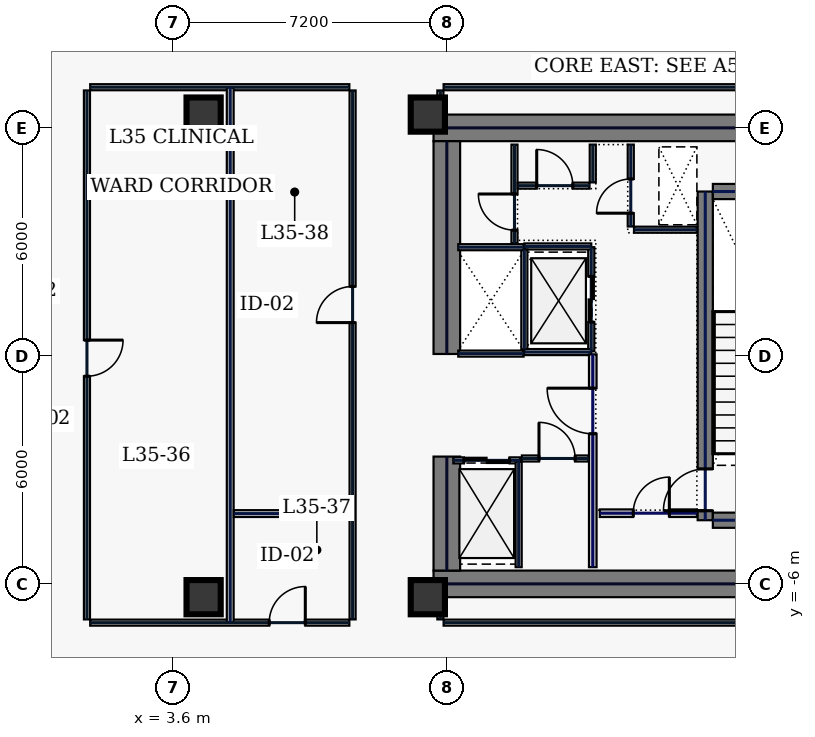
"""IFC4 building model, lengths in metres.
Left out: names, types, materials, properties, quantities, classifications, styles, units other than length and angle.
Written with IfcOpenShell. Run it as: python <this file> out.ifc"""

import sys

from ifc_helpers import new_model, si_unit, direction, frame, frame_2d, origin, origin_2d, place, context, subcontext, project, spatial, rectangle, hollow_rectangle, extrude, element, fill, save


model = new_model("IFC4")
c1 = context("Model", 3, precision=1e-05, world=origin(), true_north=direction((0.0, 1.0)))
c2 = subcontext(c1, "Body", "Model", "MODEL_VIEW")
j1 = project(units=[si_unit("LENGTHUNIT", "METRE"), si_unit("PLANEANGLEUNIT", "RADIAN")], contexts=[c1])
p1 = place(None, origin())
s1 = spatial("IfcSite", under=j1, at=p1, CompositionType="ELEMENT")
p2 = place(p1, origin())
s2 = spatial("IfcBuilding", under=s1, at=p2, CompositionType="ELEMENT")
p3 = place(p2, frame((0.0, 0.0, 156.2)))
s3 = spatial("IfcBuildingStorey", under=s2, at=p3, CompositionType="ELEMENT", Elevation=156.2)
for number, where, z_axis, x_axis in (
    (1, (10.45, 6.0, 0.0), (0.0, 0.0, 1.0), (1.0, 0.0, 0.0)),
    (2, (10.45, -6.0, 0.0), (0.0, 0.0, 1.0), (1.0, 0.0, 0.0)),
):
    element("IfcWall", number, at=place(p3, frame(where, z_axis=z_axis, x_axis=x_axis)), inside=s3, PredefinedType="SHEAR", context=c2, shape_type="SweptSolid", body=[
        extrude(rectangle(XDim=11.55, YDim=0.7, at=frame_2d((5.775, 0.0))), origin(), (0.0, 0.0, 1.0), 3.74),
    ])
p4 = place(p3, frame((10.8, -5.65, 0.0), z_axis=(0.0, 0.0, 1.0), x_axis=(0.0, 1.0, 0.0)))
e3 = element("IfcWall", 3, at=p4, inside=s3, PredefinedType="SHEAR", context=c2, shape_type="SweptSolid", body=[
    extrude(rectangle(XDim=3.0, YDim=0.7, at=frame_2d((1.5, 0.0))), origin(), (0.0, 0.0, 1.0), 3.74),
])
p5 = place(p3, frame((10.8, 0.05, 0.0), z_axis=(0.0, 0.0, 1.0), x_axis=(0.0, 1.0, 0.0)))
e4 = element("IfcWall", 4, at=p5, inside=s3, PredefinedType="SHEAR", context=c2, shape_type="SweptSolid", body=[
    extrude(rectangle(XDim=5.6, YDim=0.7, at=frame_2d((2.8, 0.0))), origin(), (0.0, 0.0, 1.0), 3.74),
])
p6 = place(p3, frame((17.6, -4.325, 0.0), z_axis=(0.0, 0.0, 1.0), x_axis=(0.0, 1.0, 0.0)))
e5 = element("IfcWall", 5, at=p6, inside=s3, PredefinedType="SHEAR", context=c2, shape_type="SweptSolid", body=[
    extrude(rectangle(XDim=8.65, YDim=0.4, at=frame_2d((4.325, 0.0))), origin(), (0.0, 0.0, 1.0), 3.74),
])
p7 = place(p6, frame((0.25, 0.0, 0.0)))
e6 = element("IfcOpeningElement", 6, at=p7, cuts=e5, PredefinedType="OPENING", context=c2, shape_type="SweptSolid", body=[
    extrude(rectangle(XDim=1.1, YDim=2.2, at=frame_2d((0.55, 1.1))), frame((0.0, 0.21, 0.0), z_axis=(0.0, -1.0, 0.0), x_axis=(1.0, 0.0, 0.0)), (0.0, 0.0, 1.0), 0.42),
])
for number, where, z_axis, x_axis in (
    (7, (17.8, -4.325, 0.0), (0.0, 0.0, 1.0), (1.0, 0.0, 0.0)),
    (8, (17.8, 4.325, 0.0), (0.0, 0.0, 1.0), (1.0, 0.0, 0.0)),
):
    element("IfcWall", number, at=place(p3, frame(where, z_axis=z_axis, x_axis=x_axis)), inside=s3, PredefinedType="SHEAR", context=c2, shape_type="SweptSolid", body=[
        extrude(rectangle(XDim=3.4, YDim=0.4, at=frame_2d((1.7, 0.0))), origin(), (0.0, 0.0, 1.0), 3.74),
    ])
for number, where, z_axis, x_axis in (
    (9, (10.3, -6.35, 0.0), (0.0, 0.0, 1.0), (1.0, 0.0, 0.0)),
    (10, (10.3, 6.35, 0.0), (0.0, 0.0, 1.0), (1.0, 0.0, 0.0)),
    (11, (4.4, -6.35, 0.0), (0.0, 0.0, 1.0), (1.0, 0.0, 0.0)),
    (12, (4.4, 6.35, 0.0), (0.0, 0.0, 1.0), (1.0, 0.0, 0.0)),
):
    element("IfcColumn", number, at=place(p3, frame(where, z_axis=z_axis, x_axis=x_axis)), inside=s3, PredefinedType="COLUMN", context=c2, shape_type="SweptSolid", body=[
        extrude(hollow_rectangle(XDim=0.9, YDim=0.9, WallThickness=0.04, at=origin_2d()), origin(), (0.0, 0.0, 1.0), 3.74),
    ])
p8 = place(p3, frame((14.6, 0.12, 0.0), z_axis=(0.0, 0.0, 1.0), x_axis=(0.0, 1.0, 0.0)))
e13 = element("IfcWall", 13, at=p8, inside=s3, PredefinedType="PARTITIONING", context=c2, shape_type="SweptSolid", body=[
    extrude(rectangle(XDim=2.74, YDim=0.16, at=frame_2d((1.37, 0.0))), origin(), (0.0, 0.0, 1.0), 3.74),
])
p9 = place(p8, frame((0.77, 0.0, 0.0)))
e14 = element("IfcOpeningElement", 14, at=p9, cuts=e13, PredefinedType="OPENING", context=c2, shape_type="SweptSolid", body=[
    extrude(rectangle(XDim=1.2, YDim=2.2, at=frame_2d((0.6, 1.1))), frame((0.0, 0.09, 0.0), z_axis=(0.0, -1.0, 0.0), x_axis=(1.0, 0.0, 0.0)), (0.0, 0.0, 1.0), 0.18),
])
for number, where, z_axis, x_axis in (
    (15, (12.84, 0.1, 0.0), (0.0, 0.0, 1.0), (1.0, 0.0, 0.0)),
    (16, (12.84, 2.88, 0.0), (0.0, 0.0, 1.0), (1.0, 0.0, 0.0)),
):
    element("IfcWall", number, at=place(p3, frame(where, z_axis=z_axis, x_axis=x_axis)), inside=s3, PredefinedType="PARTITIONING", context=c2, shape_type="SweptSolid", body=[
        extrude(rectangle(XDim=1.76, YDim=0.16, at=frame_2d((0.88, 0.0))), origin(), (0.0, 0.0, 1.0), 3.74),
    ])
p10 = place(p3, frame((12.84, 0.18, 0.0), z_axis=(0.0, 0.0, 1.0), x_axis=(0.0, 1.0, 0.0)))
e17 = element("IfcWall", 17, at=p10, inside=s3, PredefinedType="PARTITIONING", context=c2, shape_type="SweptSolid", body=[
    extrude(rectangle(XDim=2.62, YDim=0.16, at=frame_2d((1.31, 0.0))), origin(), (0.0, 0.0, 1.0), 3.74),
])
p11 = place(p3, frame((10.97, -2.75, 0.0), z_axis=(0.0, 0.0, 1.0), x_axis=(1.0, 0.0, 0.0)))
e18 = element("IfcWall", 18, at=p11, inside=s3, PredefinedType="PARTITIONING", context=c2, shape_type="SweptSolid", body=[
    extrude(rectangle(XDim=1.76, YDim=0.16, at=frame_2d((0.88, 0.0))), origin(), (0.0, 0.0, 1.0), 3.74),
])
p12 = place(p11, frame((0.28, 0.0, 0.0)))
e19 = element("IfcOpeningElement", 19, at=p12, cuts=e18, PredefinedType="OPENING", context=c2, shape_type="SweptSolid", body=[
    extrude(rectangle(XDim=1.2, YDim=2.2, at=frame_2d((0.6, 1.1))), frame((0.0, 0.09, 0.0), z_axis=(0.0, -1.0, 0.0), x_axis=(1.0, 0.0, 0.0)), (0.0, 0.0, 1.0), 0.18),
])
for number, where, z_axis, x_axis in (
    (20, (11.1, 0.06, 0.0), (0.0, 0.0, 1.0), (1.0, 0.0, 0.0)),
    (21, (11.1, 2.86, 0.0), (0.0, 0.0, 1.0), (1.0, 0.0, 0.0)),
):
    element("IfcWall", number, at=place(p3, frame(where, z_axis=z_axis, x_axis=x_axis)), inside=s3, PredefinedType="PARTITIONING", context=c2, shape_type="SweptSolid", body=[
        extrude(rectangle(XDim=1.72, YDim=0.16, at=frame_2d((0.86, 0.0))), origin(), (0.0, 0.0, 1.0), 3.74),
    ])
p13 = place(p3, frame((15.64, 3.405, 0.0), z_axis=(0.0, 0.0, 1.0), x_axis=(0.0, 1.0, 0.0)))
e22 = element("IfcWall", 22, at=p13, inside=s3, PredefinedType="PARTITIONING", context=c2, shape_type="SweptSolid", body=[
    extrude(rectangle(XDim=2.155, YDim=0.16, at=frame_2d((1.078, 0.0))), origin(), (0.0, 0.0, 1.0), 3.74),
])
p14 = place(p13, frame((0.35, 0.0, 0.0)))
e23 = element("IfcOpeningElement", 23, at=p14, cuts=e22, PredefinedType="OPENING", context=c2, shape_type="SweptSolid", body=[
    extrude(rectangle(XDim=0.9, YDim=2.2, at=frame_2d((0.45, 1.1))), frame((0.0, 0.09, 0.0), z_axis=(0.0, -1.0, 0.0), x_axis=(1.0, 0.0, 0.0)), (0.0, 0.0, 1.0), 0.18),
])
p15 = place(p3, frame((15.725, 3.32, 0.0), z_axis=(0.0, 0.0, 1.0), x_axis=(1.0, 0.0, 0.0)))
e24 = element("IfcWall", 24, at=p15, inside=s3, PredefinedType="PARTITIONING", context=c2, shape_type="SweptSolid", body=[
    extrude(rectangle(XDim=1.655, YDim=0.16, at=frame_2d((0.827, 0.0))), origin(), (0.0, 0.0, 1.0), 3.74),
])
p16 = place(p3, frame((14.825, -4.14, 0.0), z_axis=(0.0, 0.0, 1.0), x_axis=(1.0, 0.0, 0.0)))
e25 = element("IfcWall", 25, at=p16, inside=s3, PredefinedType="SOLIDWALL", context=c2, shape_type="SweptSolid", body=[
    extrude(rectangle(XDim=2.555, YDim=0.2, at=frame_2d((1.277, 0.0))), origin(), (0.0, 0.0, 1.0), 3.74),
])
p17 = place(p16, frame((0.88, 0.0, 0.0)))
e26 = element("IfcOpeningElement", 26, at=p17, cuts=e25, PredefinedType="OPENING", context=c2, shape_type="SweptSolid", body=[
    extrude(rectangle(XDim=0.95, YDim=2.2, at=frame_2d((0.475, 1.1))), frame((0.0, 0.11, 0.0), z_axis=(0.0, -1.0, 0.0), x_axis=(1.0, 0.0, 0.0)), (0.0, 0.0, 1.0), 0.22),
])
p18 = place(p3, frame((12.775, -2.7, 0.0), z_axis=(0.0, 0.0, 1.0), x_axis=(1.0, 0.0, 0.0)))
e27 = element("IfcWall", 27, at=p18, inside=s3, PredefinedType="PARTITIONING", context=c2, shape_type="SweptSolid", body=[
    extrude(rectangle(XDim=1.76, YDim=0.16, at=frame_2d((0.88, 0.0))), origin(), (0.0, 0.0, 1.0), 3.74),
])
p19 = place(p18, frame((0.45, 0.0, 0.0)))
e28 = element("IfcOpeningElement", 28, at=p19, cuts=e27, PredefinedType="OPENING", context=c2, shape_type="SweptSolid", body=[
    extrude(rectangle(XDim=0.95, YDim=2.2, at=frame_2d((0.475, 1.1))), frame((0.0, 0.09, 0.0), z_axis=(0.0, -1.0, 0.0), x_axis=(1.0, 0.0, 0.0)), (0.0, 0.0, 1.0), 0.18),
])
p20 = place(p3, frame((12.69, -5.56, 0.0), z_axis=(0.0, 0.0, 1.0), x_axis=(0.0, 1.0, 0.0)))
e29 = element("IfcWall", 29, at=p20, inside=s3, PredefinedType="PARTITIONING", context=c2, shape_type="SweptSolid", body=[
    extrude(rectangle(XDim=2.775, YDim=0.16, at=frame_2d((1.388, 0.0))), origin(), (0.0, 0.0, 1.0), 3.74),
])
p21 = place(p3, frame((12.58, 2.96, 0.0), z_axis=(0.0, 0.0, 1.0), x_axis=(0.0, 1.0, 0.0)))
e30 = element("IfcWall", 30, at=p21, inside=s3, PredefinedType="PARTITIONING", context=c2, shape_type="SweptSolid", body=[
    extrude(rectangle(XDim=2.6, YDim=0.16, at=frame_2d((1.3, 0.0))), origin(), (0.0, 0.0, 1.0), 3.74),
])
p22 = place(p21, frame((0.35, 0.0, 0.0)))
e31 = element("IfcOpeningElement", 31, at=p22, cuts=e30, PredefinedType="OPENING", context=c2, shape_type="SweptSolid", body=[
    extrude(rectangle(XDim=0.95, YDim=2.2, at=frame_2d((0.475, 1.1))), frame((0.0, 0.09, 0.0), z_axis=(0.0, -1.0, 0.0), x_axis=(1.0, 0.0, 0.0)), (0.0, 0.0, 1.0), 0.18),
])
p23 = place(p3, frame((12.665, 4.48, 0.0), z_axis=(0.0, 0.0, 1.0), x_axis=(1.0, 0.0, 0.0)))
e32 = element("IfcWall", 32, at=p23, inside=s3, PredefinedType="PARTITIONING", context=c2, shape_type="SweptSolid", body=[
    extrude(rectangle(XDim=1.89, YDim=0.16, at=frame_2d((0.945, 0.0))), origin(), (0.0, 0.0, 1.0), 3.74),
])
p24 = place(p23, frame((0.5, 0.0, 0.0)))
e33 = element("IfcOpeningElement", 33, at=p24, cuts=e32, PredefinedType="OPENING", context=c2, shape_type="SweptSolid", body=[
    extrude(rectangle(XDim=0.95, YDim=2.2, at=frame_2d((0.475, 1.1))), frame((0.0, 0.09, 0.0), z_axis=(0.0, -1.0, 0.0), x_axis=(1.0, 0.0, 0.0)), (0.0, 0.0, 1.0), 0.18),
])
p25 = place(p3, frame((14.64, 4.565, 0.0), z_axis=(0.0, 0.0, 1.0), x_axis=(0.0, 1.0, 0.0)))
e34 = element("IfcWall", 34, at=p25, inside=s3, PredefinedType="PARTITIONING", context=c2, shape_type="SweptSolid", body=[
    extrude(rectangle(XDim=0.995, YDim=0.16, at=frame_2d((0.498, 0.0))), origin(), (0.0, 0.0, 1.0), 3.74),
])
p26 = place(p3, frame((14.64, -5.56, 0.0), z_axis=(0.0, 0.0, 1.0), x_axis=(0.0, 1.0, 0.0)))
e35 = element("IfcWall", 35, at=p26, inside=s3, PredefinedType="SOLIDWALL", context=c2, shape_type="SweptSolid", body=[
    extrude(rectangle(XDim=5.6, YDim=0.2, at=frame_2d((2.8, 0.0))), origin(), (0.0, 0.0, 1.0), 3.74),
])
p27 = place(p26, frame((3.51, 0.0, 0.0)))
e36 = element("IfcOpeningElement", 36, at=p27, cuts=e35, PredefinedType="OPENING", context=c2, shape_type="SweptSolid", body=[
    extrude(rectangle(XDim=1.2, YDim=2.2, at=frame_2d((0.6, 1.1))), frame((0.0, 0.11, 0.0), z_axis=(0.0, -1.0, 0.0), x_axis=(1.0, 0.0, 0.0)), (0.0, 0.0, 1.0), 0.22),
])
p28 = place(p3, frame((24.965, 7.07, 0.0), z_axis=(0.0, 0.0, 1.0), x_axis=(-1.0, 0.0, 0.0)))
e37 = element("IfcWall", 37, at=p28, inside=s3, PredefinedType="PARTITIONING", context=c2, shape_type="SweptSolid", body=[
    extrude(rectangle(XDim=14.25, YDim=0.16, at=frame_2d((7.125, 0.0))), origin(), (0.0, 0.0, 1.0), 3.74),
])
p29 = place(p3, frame((10.63, 6.985, 0.0), z_axis=(0.0, 0.0, 1.0), x_axis=(0.0, -1.0, 0.0)))
e38 = element("IfcWall", 38, at=p29, inside=s3, PredefinedType="PARTITIONING", context=c2, shape_type="SweptSolid", body=[
    extrude(rectangle(XDim=0.565, YDim=0.16, at=frame_2d((0.283, 0.0))), origin(), (0.0, 0.0, 1.0), 3.74),
])
p30 = place(p3, frame((10.63, -6.42, 0.0), z_axis=(0.0, 0.0, 1.0), x_axis=(0.0, -1.0, 0.0)))
e39 = element("IfcWall", 39, at=p30, inside=s3, PredefinedType="PARTITIONING", context=c2, shape_type="SweptSolid", body=[
    extrude(rectangle(XDim=0.515, YDim=0.16, at=frame_2d((0.258, 0.0))), origin(), (0.0, 0.0, 1.0), 3.74),
])
p31 = place(p3, frame((10.715, -7.02, 0.0), z_axis=(0.0, 0.0, 1.0), x_axis=(1.0, 0.0, 0.0)))
e40 = element("IfcWall", 40, at=p31, inside=s3, PredefinedType="PARTITIONING", context=c2, shape_type="SweptSolid", body=[
    extrude(rectangle(XDim=14.25, YDim=0.16, at=frame_2d((7.125, 0.0))), origin(), (0.0, 0.0, 1.0), 3.74),
])
p32 = place(p3, frame((8.235, 7.07, 0.0), z_axis=(0.0, 0.0, 1.0), x_axis=(-1.0, 0.0, 0.0)))
e41 = element("IfcWall", 41, at=p32, inside=s3, PredefinedType="PARTITIONING", context=c2, shape_type="SweptSolid", body=[
    extrude(rectangle(XDim=6.82, YDim=0.16, at=frame_2d((3.41, 0.0))), origin(), (0.0, 0.0, 1.0), 3.74),
])
p33 = place(p3, frame((1.33, 6.985, 0.0), z_axis=(0.0, 0.0, 1.0), x_axis=(0.0, -1.0, 0.0)))
e42 = element("IfcWall", 42, at=p33, inside=s3, PredefinedType="PARTITIONING", context=c2, shape_type="SweptSolid", body=[
    extrude(rectangle(XDim=13.92, YDim=0.16, at=frame_2d((6.96, 0.0))), origin(), (0.0, 0.0, 1.0), 3.74),
])
p34 = place(p33, frame((6.57, 0.0, 0.0)))
e43 = element("IfcOpeningElement", 43, at=p34, cuts=e42, PredefinedType="OPENING", context=c2, shape_type="SweptSolid", body=[
    extrude(rectangle(XDim=0.95, YDim=2.2, at=frame_2d((0.475, 1.1))), frame((0.0, 0.09, 0.0), z_axis=(0.0, -1.0, 0.0), x_axis=(1.0, 0.0, 0.0)), (0.0, 0.0, 1.0), 0.18),
])
p35 = place(p3, frame((1.415, -7.02, 0.0), z_axis=(0.0, 0.0, 1.0), x_axis=(1.0, 0.0, 0.0)))
e44 = element("IfcWall", 44, at=p35, inside=s3, PredefinedType="PARTITIONING", context=c2, shape_type="SweptSolid", body=[
    extrude(rectangle(XDim=6.82, YDim=0.16, at=frame_2d((3.41, 0.0))), origin(), (0.0, 0.0, 1.0), 3.74),
])
p36 = place(p35, frame((4.711, 0.0, 0.0)))
e45 = element("IfcOpeningElement", 45, at=p36, cuts=e44, PredefinedType="OPENING", context=c2, shape_type="SweptSolid", body=[
    extrude(rectangle(XDim=0.95, YDim=2.2, at=frame_2d((0.475, 1.1))), frame((0.0, 0.09, 0.0), z_axis=(0.0, -1.0, 0.0), x_axis=(1.0, 0.0, 0.0)), (0.0, 0.0, 1.0), 0.18),
])
p37 = place(p3, frame((8.32, -6.935, 0.0), z_axis=(0.0, 0.0, 1.0), x_axis=(0.0, 1.0, 0.0)))
e46 = element("IfcWall", 46, at=p37, inside=s3, PredefinedType="PARTITIONING", context=c2, shape_type="SweptSolid", body=[
    extrude(rectangle(XDim=13.92, YDim=0.16, at=frame_2d((6.96, 0.0))), origin(), (0.0, 0.0, 1.0), 3.74),
])
p38 = place(p37, frame((7.811, 0.0, 0.0)))
e47 = element("IfcOpeningElement", 47, at=p38, cuts=e46, PredefinedType="OPENING", context=c2, shape_type="SweptSolid", body=[
    extrude(rectangle(XDim=0.95, YDim=2.2, at=frame_2d((0.475, 1.1))), frame((0.0, 0.09, 0.0), z_axis=(0.0, -1.0, 0.0), x_axis=(1.0, 0.0, 0.0)), (0.0, 0.0, 1.0), 0.18),
])
p39 = place(p3, frame((5.1, -7.015, 0.0), z_axis=(0.0, 0.0, 1.0), x_axis=(0.0, 1.0, 0.0)))
e48 = element("IfcWall", 48, at=p39, inside=s3, PredefinedType="PARTITIONING", context=c2, shape_type="SweptSolid", body=[
    extrude(rectangle(XDim=14.08, YDim=0.18, at=frame_2d((7.04, 0.0))), origin(), (0.0, 0.0, 1.0), 3.74),
])
p40 = place(p3, frame((5.195, -4.15, 0.0), z_axis=(0.0, 0.0, 1.0), x_axis=(1.0, 0.0, 0.0)))
e49 = element("IfcWall", 49, at=p40, inside=s3, PredefinedType="PARTITIONING", context=c2, shape_type="SweptSolid", body=[
    extrude(rectangle(XDim=3.12, YDim=0.18, at=frame_2d((1.56, 0.0))), origin(), (0.0, 0.0, 1.0), 3.74),
])
p41 = place(p7, origin())
e50 = element("IfcDoor", 50, at=p41, inside=s3, OperationType="SINGLE_SWING_LEFT", PredefinedType="DOOR", context=c2, shape_type="SweptSolid", body=[
    extrude(rectangle(XDim=1.1, YDim=2.2, at=frame_2d((0.55, 1.1))), frame((0.0, 0.025, 0.0), z_axis=(0.0, -1.0, 0.0), x_axis=(1.0, 0.0, 0.0)), (0.0, 0.0, 1.0), 0.05),
])
fill(e6, e50)
p42 = place(p9, origin())
e51 = element("IfcDoor", 51, at=p42, inside=s3, OperationType="SLIDING_TO_LEFT", PredefinedType="DOOR", context=c2, shape_type="SweptSolid", body=[
    extrude(rectangle(XDim=1.2, YDim=2.2, at=frame_2d((0.6, 1.1))), frame((0.0, 0.025, 0.0), z_axis=(0.0, -1.0, 0.0), x_axis=(1.0, 0.0, 0.0)), (0.0, 0.0, 1.0), 0.05),
])
fill(e14, e51)
p43 = place(p12, origin())
e52 = element("IfcDoor", 52, at=p43, inside=s3, OperationType="SLIDING_TO_LEFT", PredefinedType="DOOR", context=c2, shape_type="SweptSolid", body=[
    extrude(rectangle(XDim=1.2, YDim=2.2, at=frame_2d((0.6, 1.1))), frame((0.0, 0.025, 0.0), z_axis=(0.0, -1.0, 0.0), x_axis=(1.0, 0.0, 0.0)), (0.0, 0.0, 1.0), 0.05),
])
fill(e19, e52)
p44 = place(p14, origin())
e53 = element("IfcDoor", 53, at=p44, inside=s3, OperationType="SINGLE_SWING_LEFT", PredefinedType="DOOR", context=c2, shape_type="SweptSolid", body=[
    extrude(rectangle(XDim=0.9, YDim=2.2, at=frame_2d((0.45, 1.1))), frame((0.0, 0.025, 0.0), z_axis=(0.0, -1.0, 0.0), x_axis=(1.0, 0.0, 0.0)), (0.0, 0.0, 1.0), 0.05),
])
fill(e23, e53)
p45 = place(p17, origin())
e54 = element("IfcDoor", 54, at=p45, inside=s3, OperationType="SINGLE_SWING_RIGHT", PredefinedType="DOOR", context=c2, shape_type="SweptSolid", body=[
    extrude(rectangle(XDim=0.95, YDim=2.2, at=frame_2d((0.475, 1.1))), frame((0.0, 0.025, 0.0), z_axis=(0.0, -1.0, 0.0), x_axis=(1.0, 0.0, 0.0)), (0.0, 0.0, 1.0), 0.05),
])
fill(e26, e54)
p46 = place(p19, origin())
e55 = element("IfcDoor", 55, at=p46, inside=s3, OperationType="SINGLE_SWING_LEFT", PredefinedType="DOOR", context=c2, shape_type="SweptSolid", body=[
    extrude(rectangle(XDim=0.95, YDim=2.2, at=frame_2d((0.475, 1.1))), frame((0.0, 0.025, 0.0), z_axis=(0.0, -1.0, 0.0), x_axis=(1.0, 0.0, 0.0)), (0.0, 0.0, 1.0), 0.05),
])
fill(e28, e55)
p47 = place(p22, origin())
e56 = element("IfcDoor", 56, at=p47, inside=s3, OperationType="SINGLE_SWING_RIGHT", PredefinedType="DOOR", context=c2, shape_type="SweptSolid", body=[
    extrude(rectangle(XDim=0.95, YDim=2.2, at=frame_2d((0.475, 1.1))), frame((0.0, 0.025, 0.0), z_axis=(0.0, -1.0, 0.0), x_axis=(1.0, 0.0, 0.0)), (0.0, 0.0, 1.0), 0.05),
])
fill(e31, e56)
p48 = place(p24, origin())
e57 = element("IfcDoor", 57, at=p48, inside=s3, OperationType="SINGLE_SWING_LEFT", PredefinedType="DOOR", context=c2, shape_type="SweptSolid", body=[
    extrude(rectangle(XDim=0.95, YDim=2.2, at=frame_2d((0.475, 1.1))), frame((0.0, 0.025, 0.0), z_axis=(0.0, -1.0, 0.0), x_axis=(1.0, 0.0, 0.0)), (0.0, 0.0, 1.0), 0.05),
])
fill(e33, e57)
p49 = place(p27, origin())
e58 = element("IfcDoor", 58, at=p49, inside=s3, OperationType="SINGLE_SWING_RIGHT", PredefinedType="DOOR", context=c2, shape_type="SweptSolid", body=[
    extrude(rectangle(XDim=1.2, YDim=2.2, at=frame_2d((0.6, 1.1))), frame((0.0, 0.025, 0.0), z_axis=(0.0, -1.0, 0.0), x_axis=(1.0, 0.0, 0.0)), (0.0, 0.0, 1.0), 0.05),
])
fill(e36, e58)
p50 = place(p34, origin())
e59 = element("IfcDoor", 59, at=p50, inside=s3, OperationType="SINGLE_SWING_LEFT", PredefinedType="DOOR", context=c2, shape_type="SweptSolid", body=[
    extrude(rectangle(XDim=0.95, YDim=2.2, at=frame_2d((0.475, 1.1))), frame((0.0, 0.025, 0.0), z_axis=(0.0, -1.0, 0.0), x_axis=(1.0, 0.0, 0.0)), (0.0, 0.0, 1.0), 0.05),
])
fill(e43, e59)
p51 = place(p36, origin())
e60 = element("IfcDoor", 60, at=p51, inside=s3, OperationType="SINGLE_SWING_RIGHT", PredefinedType="DOOR", context=c2, shape_type="SweptSolid", body=[
    extrude(rectangle(XDim=0.95, YDim=2.2, at=frame_2d((0.475, 1.1))), frame((0.0, 0.025, 0.0), z_axis=(0.0, -1.0, 0.0), x_axis=(1.0, 0.0, 0.0)), (0.0, 0.0, 1.0), 0.05),
])
fill(e45, e60)
p52 = place(p38, origin())
e61 = element("IfcDoor", 61, at=p52, inside=s3, OperationType="SINGLE_SWING_LEFT", PredefinedType="DOOR", context=c2, shape_type="SweptSolid", body=[
    extrude(rectangle(XDim=0.95, YDim=2.2, at=frame_2d((0.475, 1.1))), frame((0.0, 0.025, 0.0), z_axis=(0.0, -1.0, 0.0), x_axis=(1.0, 0.0, 0.0)), (0.0, 0.0, 1.0), 0.05),
])
fill(e47, e61)
save(model, sys.argv[1])
